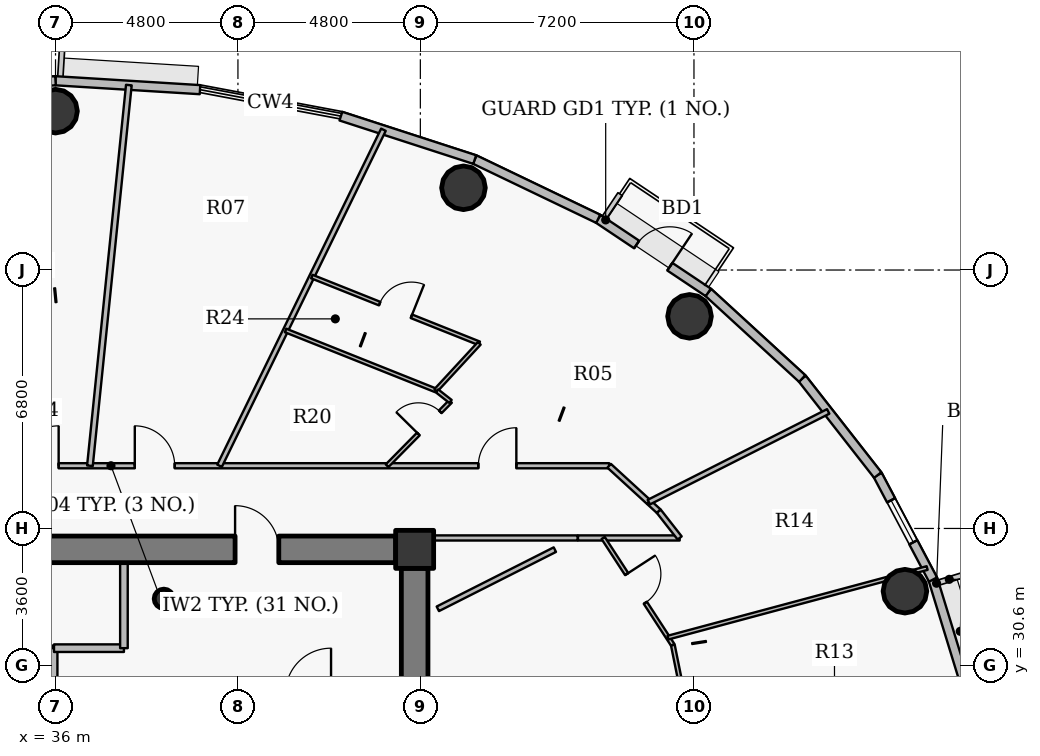
"""IFC4 building model, lengths in metres.
Left out: names, types, materials, properties, quantities, classifications, styles, units other than length and angle.
Written with IfcOpenShell. Run it as: python <this file> out.ifc"""

import sys

from ifc_helpers import new_model, si_unit, direction, frame, frame_2d, origin, origin_2d, place, context, subcontext, project, spatial, rectangle, hollow_circle, extrude, source, transform, mapped, element, fill, save


model = new_model("IFC4")
c1 = context("Model", 3, precision=1e-05, world=origin(), true_north=direction((0.0, 1.0)))
c2 = subcontext(c1, "Body", "Model", "MODEL_VIEW")
j1 = project(units=[si_unit("LENGTHUNIT", "METRE"), si_unit("PLANEANGLEUNIT", "RADIAN")], contexts=[c1])
p1 = place(None, origin())
s1 = spatial("IfcSite", under=j1, at=p1, CompositionType="ELEMENT")
p2 = place(p1, origin())
s2 = spatial("IfcBuilding", under=s1, at=p2, CompositionType="ELEMENT")
p3 = place(p2, frame((0.0, 0.0, 229.05)))
s3 = spatial("IfcBuildingStorey", under=s2, at=p3, CompositionType="ELEMENT", Elevation=229.05)
p4 = place(p3, frame((45.45, 33.65, 0.0), z_axis=(0.0, 0.0, 1.0), x_axis=(1.0, 0.0, 0.0)))
e1 = element("IfcColumn", 1, at=p4, inside=s3, PredefinedType="COLUMN", context=c2, shape_type="SweptSolid", body=[
    extrude(rectangle(XDim=1.0, YDim=1.0, at=origin_2d()), origin(), (0.0, 0.0, 1.0), 3.75),
])
p5 = place(p3, frame((38.85, 32.35, 0.0), z_axis=(0.0, 0.0, 1.0), x_axis=(1.0, 0.0, 0.0)))
e2 = element("IfcColumn", 2, at=p5, inside=s3, PredefinedType="COLUMN", context=c2, shape_type="SweptSolid", body=[
    extrude(hollow_circle(Radius=0.254, WallThickness=0.02, at=origin_2d()), origin(), (0.0, 0.0, 1.0), 3.75),
])
p6 = place(p3, frame((27.05, 33.65, 0.0), z_axis=(0.0, 0.0, 1.0), x_axis=(1.0, 0.0, 0.0)))
e3 = element("IfcWall", 3, at=p6, inside=s3, PredefinedType="SHEAR", context=c2, shape_type="SweptSolid", body=[
    extrude(rectangle(XDim=17.9, YDim=0.7, at=frame_2d((8.95, 0.0))), origin(), (0.0, 0.0, 1.0), 3.05),
])
p7 = place(p6, frame((13.675, 0.0, 0.0)))
e4 = element("IfcOpeningElement", 4, at=p7, cuts=e3, PredefinedType="OPENING", context=c2, shape_type="SweptSolid", body=[
    extrude(rectangle(XDim=1.15, YDim=2.15, at=origin_2d()), frame((0.575, 0.36, 1.075), z_axis=(0.0, -1.0, 0.0), x_axis=(1.0, 0.0, 0.0)), (0.0, 0.0, 1.0), 0.72),
])
p8 = place(p3, frame((45.45, 33.15, 0.0), z_axis=(0.0, 0.0, 1.0), x_axis=(0.0, -1.0, 0.0)))
e5 = element("IfcWall", 5, at=p8, inside=s3, PredefinedType="SHEAR", context=c2, shape_type="SweptSolid", body=[
    extrude(rectangle(XDim=12.3, YDim=0.7, at=frame_2d((6.15, 0.0))), origin(), (0.0, 0.0, 1.0), 3.05),
])
for number, where, z_axis, x_axis in (
    (6, (58.351, 32.549, 0.0), (0.0, 0.0, 1.0), (1.0, 0.0, 0.0)),
    (7, (52.683, 39.781, 0.0), (0.0, 0.0, 1.0), (1.0, 0.0, 0.0)),
    (8, (46.735, 43.164, 0.0), (0.0, 0.0, 1.0), (1.0, 0.0, 0.0)),
    (9, (36.0, 45.18, 0.0), (0.0, 0.0, 1.0), (1.0, 0.0, 0.0)),
):
    element("IfcColumn", number, at=place(p3, frame(where, z_axis=z_axis, x_axis=x_axis)), inside=s3, PredefinedType="COLUMN", context=c2, shape_type="SweptSolid", body=[
        extrude(hollow_circle(Radius=0.575, WallThickness=0.036, at=origin_2d()), origin(), (0.0, 0.0, 1.0), 3.75),
    ])
p9 = place(p3, frame((59.09, 32.856, 0.0), z_axis=(0.0, 0.0, 1.0), x_axis=(0.293132907334, -0.95607170162, 0.0)))
e10 = element("IfcWall", 10, at=p9, inside=s3, PredefinedType="SOLIDWALL", context=c2, shape_type="SweptSolid", body=[
    extrude(rectangle(XDim=3.025, YDim=0.24, at=frame_2d((1.512, 0.0))), origin(), (0.0, 0.0, 1.0), 3.5),
])
p10 = place(p3, frame((57.636, 35.605, 0.0), z_axis=(0.0, 0.0, 1.0), x_axis=(0.46766049993, -0.883908172157, 0.0)))
e11 = element("IfcWall", 11, at=p10, inside=s3, PredefinedType="SOLIDWALL", context=c2, shape_type="SweptSolid", body=[
    extrude(rectangle(XDim=3.11, YDim=0.24, at=frame_2d((1.555, 0.0))), origin(), (0.0, 0.0, 1.0), 3.5),
])
p11 = place(p10, frame((0.751, 0.0, 0.9)))
e12 = element("IfcOpeningElement", 12, at=p11, cuts=e11, PredefinedType="OPENING", context=c2, shape_type="SweptSolid", body=[
    extrude(rectangle(XDim=1.25, YDim=1.65, at=origin_2d()), frame((0.625, 0.13, 0.825), z_axis=(0.0, -1.0, 0.0), x_axis=(1.0, 0.0, 0.0)), (0.0, 0.0, 1.0), 0.26),
])
p12 = place(p3, frame((55.648, 38.145, 0.0), z_axis=(0.0, 0.0, 1.0), x_axis=(0.616312344705, -0.787501805562, 0.0)))
e13 = element("IfcWall", 13, at=p12, inside=s3, PredefinedType="SOLIDWALL", context=c2, shape_type="SweptSolid", body=[
    extrude(rectangle(XDim=3.225, YDim=0.24, at=frame_2d((1.612, 0.0))), origin(), (0.0, 0.0, 1.0), 3.5),
])
p13 = place(p3, frame((53.176, 40.411, 0.0), z_axis=(0.0, 0.0, 1.0), x_axis=(0.737123922599, -0.675757591694, 0.0)))
e14 = element("IfcWall", 14, at=p13, inside=s3, PredefinedType="SOLIDWALL", context=c2, shape_type="SweptSolid", body=[
    extrude(rectangle(XDim=3.354, YDim=0.24, at=frame_2d((1.677, 0.0))), origin(), (0.0, 0.0, 1.0), 3.5),
])
p14 = place(p3, frame((50.28, 42.348, 0.0), z_axis=(0.0, 0.0, 1.0), x_axis=(0.831262496074, -0.555880079352, 0.0)))
e15 = element("IfcWall", 15, at=p14, inside=s3, PredefinedType="SOLIDWALL", context=c2, shape_type="SweptSolid", body=[
    extrude(rectangle(XDim=3.484, YDim=0.24, at=frame_2d((1.742, 0.0))), origin(), (0.0, 0.0, 1.0), 3.5),
])
p15 = place(p14, frame((1.217, 0.0, 0.0)))
e16 = element("IfcOpeningElement", 16, at=p15, cuts=e15, PredefinedType="OPENING", context=c2, shape_type="SweptSolid", body=[
    extrude(rectangle(XDim=1.05, YDim=2.15, at=origin_2d()), frame((0.525, 0.13, 1.075), z_axis=(0.0, -1.0, 0.0), x_axis=(1.0, 0.0, 0.0)), (0.0, 0.0, 1.0), 0.26),
])
p16 = place(p3, frame((47.031, 43.906, 0.0), z_axis=(0.0, 0.0, 1.0), x_axis=(0.901598104751, -0.432574684313, 0.0)))
e17 = element("IfcWall", 17, at=p16, inside=s3, PredefinedType="SOLIDWALL", context=c2, shape_type="SweptSolid", body=[
    extrude(rectangle(XDim=3.604, YDim=0.24, at=frame_2d((1.802, 0.0))), origin(), (0.0, 0.0, 1.0), 3.5),
])
p17 = place(p3, frame((43.509, 45.049, 0.0), z_axis=(0.0, 0.0, 1.0), x_axis=(0.951210789182, -0.308541787354, 0.0)))
e18 = element("IfcWall", 18, at=p17, inside=s3, PredefinedType="SOLIDWALL", context=c2, shape_type="SweptSolid", body=[
    extrude(rectangle(XDim=3.702, YDim=0.24, at=frame_2d((1.851, 0.0))), origin(), (0.0, 0.0, 1.0), 3.5),
])
p18 = place(p3, frame((36.0, 45.98, 0.0), z_axis=(0.0, 0.0, 1.0), x_axis=(0.998108785312, -0.06147237333, 0.0)))
e19 = element("IfcWall", 19, at=p18, inside=s3, PredefinedType="SOLIDWALL", context=c2, shape_type="SweptSolid", body=[
    extrude(rectangle(XDim=3.809, YDim=0.24, at=frame_2d((1.904, 0.0))), origin(), (0.0, 0.0, 1.0), 3.5),
])
p19 = place(p3, frame((32.198, 45.746, 0.0), z_axis=(0.0, 0.0, 1.0), x_axis=(0.998108785312, 0.06147237333, 0.0)))
e20 = element("IfcWall", 20, at=p19, inside=s3, PredefinedType="SOLIDWALL", context=c2, shape_type="SweptSolid", body=[
    extrude(rectangle(XDim=3.809, YDim=0.24, at=frame_2d((1.904, 0.0))), origin(), (0.0, 0.0, 1.0), 3.5),
])
p20 = place(p19, frame((0.913, 0.0, 0.9)))
e21 = element("IfcOpeningElement", 21, at=p20, cuts=e20, PredefinedType="OPENING", context=c2, shape_type="SweptSolid", body=[
    extrude(rectangle(XDim=2.0, YDim=1.75, at=origin_2d()), frame((1.0, 0.13, 0.875), z_axis=(0.0, -1.0, 0.0), x_axis=(1.0, 0.0, 0.0)), (0.0, 0.0, 1.0), 0.26),
])
p21 = place(p3, frame((24.35, 35.85, 0.0), z_axis=(0.0, 0.0, 1.0), x_axis=(1.0, 0.0, 0.0)))
e22 = element("IfcWall", 22, at=p21, inside=s3, PredefinedType="PARTITIONING", context=c2, shape_type="SweptSolid", body=[
    extrude(rectangle(XDim=26.218, YDim=0.135, at=frame_2d((13.109, 0.0))), origin(), (0.0, 0.0, 1.0), 2.935),
])
p22 = place(p21, frame((3.557, 0.0, 0.0)))
e23 = element("IfcOpeningElement", 23, at=p22, cuts=e22, PredefinedType="OPENING", context=c2, shape_type="SweptSolid", body=[
    extrude(rectangle(XDim=1.0, YDim=2.15, at=origin_2d()), frame((0.5, 0.078, 1.075), z_axis=(0.0, -1.0, 0.0), x_axis=(1.0, 0.0, 0.0)), (0.0, 0.0, 1.0), 0.155),
])
p23 = place(p21, frame((22.776, 0.0, 0.0)))
e24 = element("IfcOpeningElement", 24, at=p23, cuts=e22, PredefinedType="OPENING", context=c2, shape_type="SweptSolid", body=[
    extrude(rectangle(XDim=1.0, YDim=2.15, at=origin_2d()), frame((0.5, 0.078, 1.075), z_axis=(0.0, -1.0, 0.0), x_axis=(1.0, 0.0, 0.0)), (0.0, 0.0, 1.0), 0.155),
])
p24 = place(p21, frame((13.736, 0.0, 0.0)))
e25 = element("IfcOpeningElement", 25, at=p24, cuts=e22, PredefinedType="OPENING", context=c2, shape_type="SweptSolid", body=[
    extrude(rectangle(XDim=1.05, YDim=2.15, at=origin_2d()), frame((0.525, 0.078, 1.075), z_axis=(0.0, -1.0, 0.0), x_axis=(1.0, 0.0, 0.0)), (0.0, 0.0, 1.0), 0.155),
])
p25 = place(p21, frame((10.682, 0.0, 0.0)))
e26 = element("IfcOpeningElement", 26, at=p25, cuts=e22, PredefinedType="OPENING", context=c2, shape_type="SweptSolid", body=[
    extrude(rectangle(XDim=1.05, YDim=2.15, at=origin_2d()), frame((0.525, 0.078, 1.075), z_axis=(0.0, -1.0, 0.0), x_axis=(1.0, 0.0, 0.0)), (0.0, 0.0, 1.0), 0.155),
])
p26 = place(p21, frame((8.557, 0.0, 0.0)))
e27 = element("IfcOpeningElement", 27, at=p26, cuts=e22, PredefinedType="OPENING", context=c2, shape_type="SweptSolid", body=[
    extrude(rectangle(XDim=0.82, YDim=2.1, at=origin_2d()), frame((0.41, 0.078, 1.05), z_axis=(0.0, -1.0, 0.0), x_axis=(1.0, 0.0, 0.0)), (0.0, 0.0, 1.0), 0.155),
])
p27 = place(p3, frame((35.05, 30.85, 0.0), z_axis=(0.0, 0.0, 1.0), x_axis=(1.0, 0.0, 0.0)))
e28 = element("IfcWall", 28, at=p27, inside=s3, PredefinedType="PARTITIONING", context=c2, shape_type="SweptSolid", body=[
    extrude(rectangle(XDim=0.9, YDim=0.2, at=frame_2d((0.45, 0.0))), origin(), (0.0, 0.0, 1.0), 3.5),
])
p28 = place(p3, frame((35.05, 31.05, 0.0), z_axis=(0.0, 0.0, 1.0), x_axis=(1.0, 0.0, 0.0)))
e29 = element("IfcWall", 29, at=p28, inside=s3, PredefinedType="PARTITIONING", context=c2, shape_type="SweptSolid", body=[
    extrude(rectangle(XDim=0.9, YDim=0.135, at=frame_2d((0.45, 0.0))), origin(), (0.0, 0.0, 1.0), 3.5),
])
p29 = place(p3, frame((35.95, 27.25, 0.0), z_axis=(0.0, 0.0, 1.0), x_axis=(0.0, 1.0, 0.0)))
e30 = element("IfcWall", 30, at=p29, inside=s3, PredefinedType="PARTITIONING", context=c2, shape_type="SweptSolid", body=[
    extrude(rectangle(XDim=3.8, YDim=0.2, at=frame_2d((1.9, 0.0))), origin(), (0.0, 0.0, 1.0), 3.5),
])
p30 = place(p3, frame((35.96, 31.05, 0.0), z_axis=(0.0, 0.0, 1.0), x_axis=(1.0, 0.0, 0.0)))
e31 = element("IfcWall", 31, at=p30, inside=s3, PredefinedType="PARTITIONING", context=c2, shape_type="SweptSolid", body=[
    extrude(rectangle(XDim=1.84, YDim=0.2, at=frame_2d((0.92, 0.0))), origin(), (0.0, 0.0, 1.0), 3.5),
])
p31 = place(p3, frame((36.905, 35.85, 0.0), z_axis=(0.0, 0.0, 1.0), x_axis=(0.101745833159, 0.994810426883, 0.0)))
e32 = element("IfcWall", 32, at=p31, inside=s3, PredefinedType="PARTITIONING", context=c2, shape_type="SweptSolid", body=[
    extrude(rectangle(XDim=10.068, YDim=0.15, at=frame_2d((5.034, 0.0))), origin(), (0.0, 0.0, 1.0), 2.985),
])
p32 = place(p3, frame((37.8, 31.05, 0.0), z_axis=(0.0, 0.0, 1.0), x_axis=(0.0, 1.0, 0.0)))
e33 = element("IfcWall", 33, at=p32, inside=s3, PredefinedType="PARTITIONING", context=c2, shape_type="SweptSolid", body=[
    extrude(rectangle(XDim=2.25, YDim=0.2, at=frame_2d((1.125, 0.0))), origin(), (0.0, 0.0, 1.0), 3.085),
])
p33 = place(p3, frame((40.316, 35.85, 0.0), z_axis=(0.0, 0.0, 1.0), x_axis=(0.438375708348, 0.898791821464, 0.0)))
e34 = element("IfcWall", 34, at=p33, inside=s3, PredefinedType="PARTITIONING", context=c2, shape_type="SweptSolid", body=[
    extrude(rectangle(XDim=9.836, YDim=0.135, at=frame_2d((4.918, 0.0))), origin(), (0.0, 0.0, 1.0), 2.985),
])
p34 = place(p3, frame((42.053, 39.41, 0.0), z_axis=(0.0, 0.0, 1.0), x_axis=(0.928800647075, -0.370579759286, 0.0)))
e35 = element("IfcWall", 35, at=p34, inside=s3, PredefinedType="PARTITIONING", context=c2, shape_type="SweptSolid", body=[
    extrude(rectangle(XDim=4.257, YDim=0.1, at=frame_2d((2.129, 0.0))), origin(), (0.0, 0.0, 1.0), 2.935),
])
p35 = place(p3, frame((42.744, 40.828, 0.0), z_axis=(0.0, 0.0, 1.0), x_axis=(0.928817025393, -0.370538706939, 0.0)))
e36 = element("IfcWall", 36, at=p35, inside=s3, PredefinedType="PARTITIONING", context=c2, shape_type="SweptSolid", body=[
    extrude(rectangle(XDim=4.744, YDim=0.1, at=frame_2d((2.372, 0.0))), origin(), (0.0, 0.0, 1.0), 2.935),
])
p36 = place(p35, frame((1.922, 0.0, 0.0)))
e37 = element("IfcOpeningElement", 37, at=p36, cuts=e36, PredefinedType="OPENING", context=c2, shape_type="SweptSolid", body=[
    extrude(rectangle(XDim=0.9, YDim=2.1, at=origin_2d()), frame((0.45, 0.06, 1.05), z_axis=(0.0, -1.0, 0.0), x_axis=(1.0, 0.0, 0.0)), (0.0, 0.0, 1.0), 0.12),
])
p37 = place(p3, frame((44.724, 35.85, 0.0), z_axis=(0.0, 0.0, 1.0), x_axis=(0.702107196604, 0.712071263622, 0.0)))
e38 = element("IfcWall", 38, at=p37, inside=s3, PredefinedType="PARTITIONING", context=c2, shape_type="SweptSolid", body=[
    extrude(rectangle(XDim=2.377, YDim=0.1, at=frame_2d((1.188, 0.0))), origin(), (0.0, 0.0, 1.0), 3.5),
])
p38 = place(p37, frame((1.173, 0.0, 0.0)))
e39 = element("IfcOpeningElement", 39, at=p38, cuts=e38, PredefinedType="OPENING", context=c2, shape_type="SweptSolid", body=[
    extrude(rectangle(XDim=0.82, YDim=2.1, at=origin_2d()), frame((0.41, 0.06, 1.05), z_axis=(0.0, -1.0, 0.0), x_axis=(1.0, 0.0, 0.0)), (0.0, 0.0, 1.0), 0.12),
])
p39 = place(p3, frame((46.007, 37.832, 0.0), z_axis=(0.0, 0.0, 1.0), x_axis=(0.678598883011, 0.734509057791, 0.0)))
e40 = element("IfcWall", 40, at=p39, inside=s3, PredefinedType="PARTITIONING", context=c2, shape_type="SweptSolid", body=[
    extrude(rectangle(XDim=1.686, YDim=0.1, at=frame_2d((0.843, 0.0))), origin(), (0.0, 0.0, 1.0), 2.985),
])
p40 = place(p3, frame((46.039, 37.819, 0.0), z_axis=(0.0, 0.0, 1.0), x_axis=(0.787505001008, -0.616308261658, 0.0)))
e41 = element("IfcWall", 41, at=p40, inside=s3, PredefinedType="PARTITIONING", context=c2, shape_type="SweptSolid", body=[
    extrude(rectangle(XDim=0.449, YDim=0.1, at=frame_2d((0.225, 0.0))), origin(), (0.0, 0.0, 1.0), 3.5),
])
p41 = place(p3, frame((49.748, 33.95, 0.0), z_axis=(0.0, 0.0, 1.0), x_axis=(1.0, 0.0, 0.0)))
e42 = element("IfcWall", 42, at=p41, inside=s3, PredefinedType="PARTITIONING", context=c2, shape_type="SweptSolid", body=[
    extrude(rectangle(XDim=2.676, YDim=0.135, at=frame_2d((1.338, 0.0))), origin(), (0.0, 0.0, 1.0), 3.5),
])
p42 = place(p3, frame((50.411, 33.95, 0.0), z_axis=(0.0, 0.0, 1.0), x_axis=(0.545427530909, -0.838157985422, 0.0)))
e43 = element("IfcWall", 43, at=p42, inside=s3, PredefinedType="PARTITIONING", context=c2, shape_type="SweptSolid", body=[
    extrude(rectangle(XDim=3.36, YDim=0.1, at=frame_2d((1.68, 0.0))), origin(), (0.0, 0.0, 1.0), 2.935),
])
p43 = place(p42, frame((1.135, 0.0, 0.0)))
e44 = element("IfcOpeningElement", 44, at=p43, cuts=e43, PredefinedType="OPENING", context=c2, shape_type="SweptSolid", body=[
    extrude(rectangle(XDim=0.9, YDim=2.1, at=origin_2d()), frame((0.45, 0.06, 1.05), z_axis=(0.0, -1.0, 0.0), x_axis=(1.0, 0.0, 0.0)), (0.0, 0.0, 1.0), 0.12),
])
p44 = place(p3, frame((50.568, 35.85, 0.0), z_axis=(0.0, 0.0, 1.0), x_axis=(0.737032525587, -0.675857275042, 0.0)))
e45 = element("IfcWall", 45, at=p44, inside=s3, PredefinedType="PARTITIONING", context=c2, shape_type="SweptSolid", body=[
    extrude(rectangle(XDim=1.417, YDim=0.135, at=frame_2d((0.708, 0.0))), origin(), (0.0, 0.0, 1.0), 3.5),
])
p45 = place(p3, frame((51.62, 34.886, 0.0), z_axis=(0.0, 0.0, 1.0), x_axis=(0.736889635292, -0.676013065998, 0.0)))
e46 = element("IfcWall", 46, at=p45, inside=s3, PredefinedType="PARTITIONING", context=c2, shape_type="SweptSolid", body=[
    extrude(rectangle(XDim=0.345, YDim=0.135, at=frame_2d((0.172, 0.0))), origin(), (0.0, 0.0, 1.0), 3.5),
])
p46 = place(p3, frame((51.612, 34.893, 0.0), z_axis=(0.0, 0.0, 1.0), x_axis=(0.892442847759, 0.451160463122, 0.0)))
e47 = element("IfcWall", 47, at=p46, inside=s3, PredefinedType="PARTITIONING", context=c2, shape_type="SweptSolid", body=[
    extrude(rectangle(XDim=5.289, YDim=0.135, at=frame_2d((2.645, 0.0))), origin(), (0.0, 0.0, 1.0), 2.985),
])
p47 = place(p3, frame((51.874, 34.653, 0.0), z_axis=(0.0, 0.0, 1.0), x_axis=(0.61628613448, -0.787522317429, 0.0)))
e48 = element("IfcWall", 48, at=p47, inside=s3, PredefinedType="PARTITIONING", context=c2, shape_type="SweptSolid", body=[
    extrude(rectangle(XDim=0.893, YDim=0.135, at=frame_2d((0.446, 0.0))), origin(), (0.0, 0.0, 1.0), 3.5),
])
p48 = place(p3, frame((52.117, 31.328, 0.0), z_axis=(0.0, 0.0, 1.0), x_axis=(0.965792157348, 0.259317390095, 0.0)))
e49 = element("IfcWall", 49, at=p48, inside=s3, PredefinedType="PARTITIONING", context=c2, shape_type="SweptSolid", body=[
    extrude(rectangle(XDim=7.06, YDim=0.1, at=frame_2d((3.53, 0.0))), origin(), (0.0, 0.0, 1.0), 2.985),
])
p49 = place(p3, frame((52.244, 31.133, 0.0), z_axis=(0.0, 0.0, 1.0), x_axis=(0.198216162216, -0.980158330596, 0.0)))
e50 = element("IfcWall", 50, at=p49, inside=s3, PredefinedType="PARTITIONING", context=c2, shape_type="SweptSolid", body=[
    extrude(rectangle(XDim=4.09, YDim=0.1, at=frame_2d((2.045, 0.0))), origin(), (0.0, 0.0, 1.0), 2.935),
])
p50 = place(p49, frame((1.595, 0.0, 0.0)))
e51 = element("IfcOpeningElement", 51, at=p50, cuts=e50, PredefinedType="OPENING", context=c2, shape_type="SweptSolid", body=[
    extrude(rectangle(XDim=0.9, YDim=2.1, at=origin_2d()), frame((0.45, 0.06, 1.05), z_axis=(0.0, -1.0, 0.0), x_axis=(1.0, 0.0, 0.0)), (0.0, 0.0, 1.0), 0.12),
])
p51 = place(p3, frame((49.738, 33.95, 0.0), z_axis=(0.0, 0.0, 1.0), x_axis=(-1.0, 0.0, 0.0)))
e52 = element("IfcWall", 52, at=p51, inside=s3, PredefinedType="PARTITIONING", context=c2, shape_type="SweptSolid", body=[
    extrude(rectangle(XDim=3.938, YDim=0.135, at=frame_2d((1.969, 0.0))), origin(), (0.0, 0.0, 1.0), 3.5),
])
p52 = place(p3, frame((45.79, 34.0, 0.0), z_axis=(0.0, 0.0, 1.0), x_axis=(-1.0, 0.0, 0.0)))
e53 = element("IfcWall", 53, at=p52, inside=s3, PredefinedType="PARTITIONING", context=c2, shape_type="SweptSolid", body=[
    extrude(rectangle(XDim=0.83, YDim=0.135, at=frame_2d((0.415, 0.0))), origin(), (0.0, 0.0, 1.0), 2.935),
])
p53 = place(p3, frame((46.06, 32.086, 0.0), z_axis=(0.0, 0.0, 1.0), x_axis=(0.892408614257, 0.451228174209, 0.0)))
e54 = element("IfcWall", 54, at=p53, inside=s3, PredefinedType="PARTITIONING", context=c2, shape_type="SweptSolid", body=[
    extrude(rectangle(XDim=3.45, YDim=0.135, at=frame_2d((1.725, 0.0))), origin(), (0.0, 0.0, 1.0), 3.5),
])
m1 = source(origin(), c2, "Body", "SweptSolid", [
    extrude(rectangle(XDim=1.25, YDim=1.65, at=origin_2d()), frame((0.625, 0.03, 0.825), z_axis=(0.0, -1.0, 0.0), x_axis=(1.0, 0.0, 0.0)), (0.0, 0.0, 1.0), 0.06),
])
p54 = place(p11, origin())
e55 = element("IfcWindow", 55, at=p54, inside=s3, PartitioningType="SINGLE_PANEL", PredefinedType="WINDOW", context=c2, shape_type="MappedRepresentation", body=[
    mapped(m1, transform((0.0, 0.0, 0.0), x_axis=(1.0, 0.0, 0.0), y_axis=(0.0, 1.0, 0.0), z_axis=(0.0, 0.0, 1.0), scale=1.0)),
])
fill(e12, e55)
m2 = source(origin(), c2, "Body", "SweptSolid", [
    extrude(rectangle(XDim=1.05, YDim=2.15, at=origin_2d()), frame((0.525, 0.025, 1.075), z_axis=(0.0, -1.0, 0.0), x_axis=(1.0, 0.0, 0.0)), (0.0, 0.0, 1.0), 0.05),
])
p55 = place(p15, origin())
e56 = element("IfcDoor", 56, at=p55, inside=s3, OperationType="SINGLE_SWING_RIGHT", PredefinedType="DOOR", context=c2, shape_type="MappedRepresentation", body=[
    mapped(m2, transform((0.0, 0.0, 0.0), x_axis=(1.0, 0.0, 0.0), y_axis=(0.0, 1.0, 0.0), z_axis=(0.0, 0.0, 1.0), scale=1.0)),
])
fill(e16, e56)
m3 = source(origin(), c2, "Body", "SweptSolid", [
    extrude(rectangle(XDim=1.15, YDim=2.15, at=origin_2d()), frame((0.575, 0.025, 1.075), z_axis=(0.0, -1.0, 0.0), x_axis=(1.0, 0.0, 0.0)), (0.0, 0.0, 1.0), 0.05),
])
p56 = place(p7, origin())
e57 = element("IfcDoor", 57, at=p56, inside=s3, OperationType="SINGLE_SWING_LEFT", PredefinedType="DOOR", context=c2, shape_type="MappedRepresentation", body=[
    mapped(m3, transform((0.0, 0.0, 0.0), x_axis=(1.0, 0.0, 0.0), y_axis=(0.0, 1.0, 0.0), z_axis=(0.0, 0.0, 1.0), scale=1.0)),
])
fill(e4, e57)
m4 = source(origin(), c2, "Body", "SweptSolid", [
    extrude(rectangle(XDim=0.9, YDim=2.1, at=origin_2d()), frame((0.45, 0.025, 1.05), z_axis=(0.0, -1.0, 0.0), x_axis=(1.0, 0.0, 0.0)), (0.0, 0.0, 1.0), 0.05),
])
p57 = place(p43, origin())
e58 = element("IfcDoor", 58, at=p57, inside=s3, OperationType="SINGLE_SWING_LEFT", PredefinedType="DOOR", context=c2, shape_type="MappedRepresentation", body=[
    mapped(m4, transform((0.0, 0.0, 0.0), x_axis=(1.0, 0.0, 0.0), y_axis=(0.0, 1.0, 0.0), z_axis=(0.0, 0.0, 1.0), scale=1.0)),
])
fill(e44, e58)
m5 = source(origin(), c2, "Body", "SweptSolid", [
    extrude(rectangle(XDim=1.0, YDim=2.15, at=origin_2d()), frame((0.5, 0.025, 1.075), z_axis=(0.0, -1.0, 0.0), x_axis=(1.0, 0.0, 0.0)), (0.0, 0.0, 1.0), 0.05),
])
p58 = place(p23, origin())
e59 = element("IfcDoor", 59, at=p58, inside=s3, OperationType="SINGLE_SWING_RIGHT", PredefinedType="DOOR", context=c2, shape_type="MappedRepresentation", body=[
    mapped(m5, transform((0.0, 0.0, 0.0), x_axis=(1.0, 0.0, 0.0), y_axis=(0.0, 1.0, 0.0), z_axis=(0.0, 0.0, 1.0), scale=1.0)),
])
fill(e24, e59)
m6 = source(origin(), c2, "Body", "SweptSolid", [
    extrude(rectangle(XDim=0.82, YDim=2.1, at=origin_2d()), frame((0.41, 0.025, 1.05), z_axis=(0.0, -1.0, 0.0), x_axis=(1.0, 0.0, 0.0)), (0.0, 0.0, 1.0), 0.05),
])
p59 = place(p38, origin())
e60 = element("IfcDoor", 60, at=p59, inside=s3, OperationType="SINGLE_SWING_LEFT", PredefinedType="DOOR", context=c2, shape_type="MappedRepresentation", body=[
    mapped(m6, transform((0.0, 0.0, 0.0), x_axis=(1.0, 0.0, 0.0), y_axis=(0.0, 1.0, 0.0), z_axis=(0.0, 0.0, 1.0), scale=1.0)),
])
fill(e39, e60)
p60 = place(p36, origin())
e61 = element("IfcDoor", 61, at=p60, inside=s3, OperationType="SINGLE_SWING_RIGHT", PredefinedType="DOOR", context=c2, shape_type="MappedRepresentation", body=[
    mapped(m4, transform((0.0, 0.0, 0.0), x_axis=(1.0, 0.0, 0.0), y_axis=(0.0, 1.0, 0.0), z_axis=(0.0, 0.0, 1.0), scale=1.0)),
])
fill(e37, e61)
p61 = place(p24, origin())
e62 = element("IfcDoor", 62, at=p61, inside=s3, OperationType="SINGLE_SWING_LEFT", PredefinedType="DOOR", context=c2, shape_type="MappedRepresentation", body=[
    mapped(m2, transform((0.0, 0.0, 0.0), x_axis=(1.0, 0.0, 0.0), y_axis=(0.0, 1.0, 0.0), z_axis=(0.0, 0.0, 1.0), scale=1.0)),
])
fill(e25, e62)
p62 = place(p25, origin())
e63 = element("IfcDoor", 63, at=p62, inside=s3, OperationType="SINGLE_SWING_RIGHT", PredefinedType="DOOR", context=c2, shape_type="MappedRepresentation", body=[
    mapped(m2, transform((0.0, 0.0, 0.0), x_axis=(1.0, 0.0, 0.0), y_axis=(0.0, 1.0, 0.0), z_axis=(0.0, 0.0, 1.0), scale=1.0)),
])
fill(e26, e63)
save(model, sys.argv[1])
